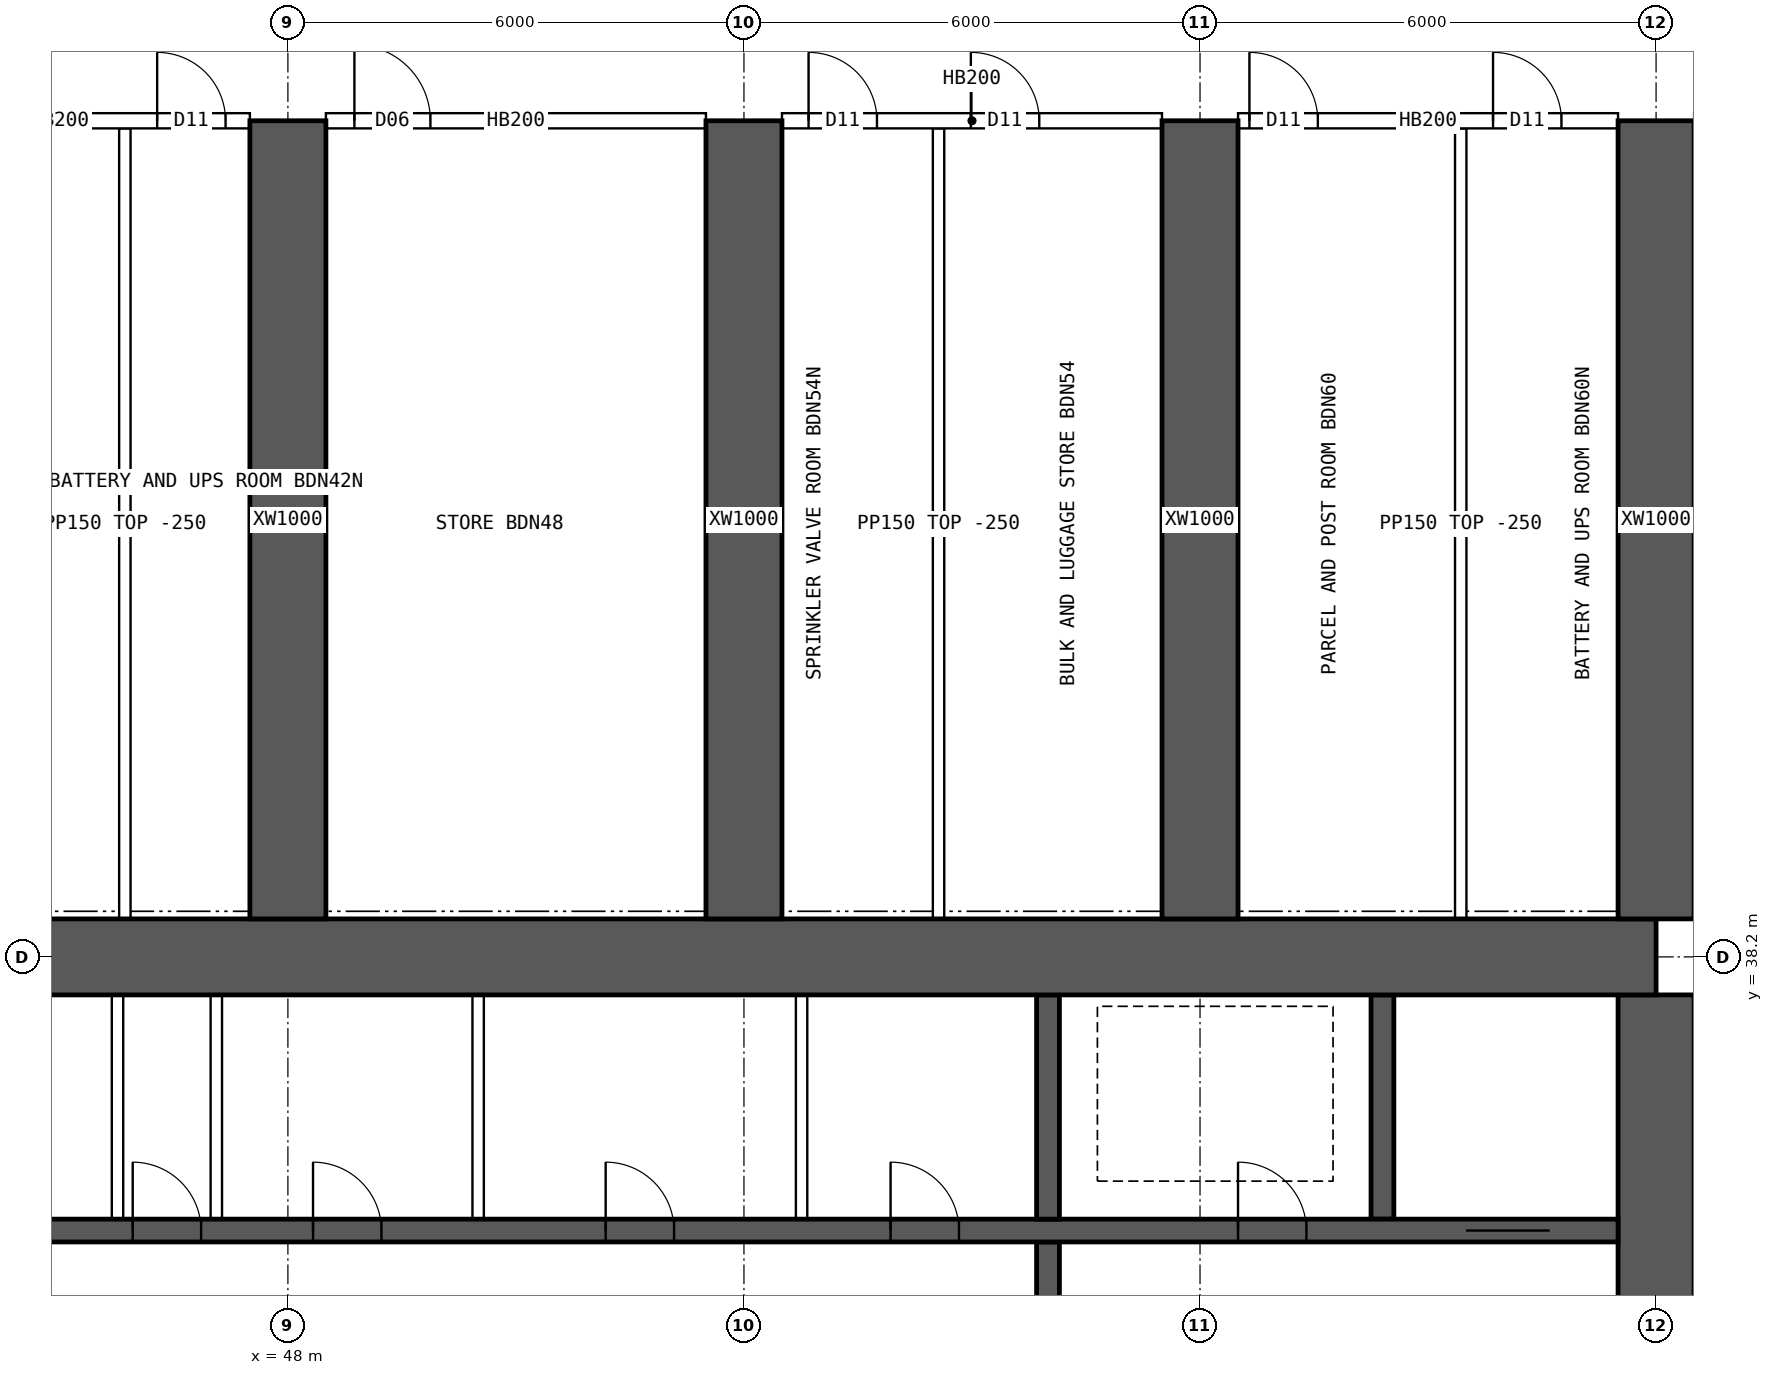
"""IFC4 building model, lengths in metres.
Left out: names, types, materials, properties, quantities, classifications, styles, units other than length and angle.
Written with IfcOpenShell. Run it as: python <this file> out.ifc"""

import sys

from ifc_helpers import new_model, si_unit, direction, frame, frame_2d, origin, place, context, subcontext, project, spatial, rectangle, extrude, element, fill, save


model = new_model("IFC4")
c1 = context("Model", 3, precision=1e-05, world=origin(), true_north=direction((0.0, 1.0)))
c2 = subcontext(c1, "Body", "Model", "MODEL_VIEW")
j1 = project(units=[si_unit("LENGTHUNIT", "METRE"), si_unit("PLANEANGLEUNIT", "RADIAN")], contexts=[c1])
p1 = place(None, origin())
s1 = spatial("IfcSite", under=j1, at=p1, CompositionType="ELEMENT")
p2 = place(p1, origin())
s2 = spatial("IfcBuilding", under=s1, at=p2, CompositionType="ELEMENT")
p3 = place(p2, frame((0.0, 0.0, 23.95)))
s3 = spatial("IfcBuildingStorey", under=s2, at=p3, CompositionType="ELEMENT", Elevation=23.95)
p4 = place(p3, frame((18.0, 38.2, 0.0), z_axis=(0.0, 0.0, 1.0), x_axis=(1.0, 0.0, 0.0)))
e1 = element("IfcWall", 1, at=p4, inside=s3, PredefinedType="SHEAR", context=c2, shape_type="SweptSolid", body=[
    extrude(rectangle(XDim=48.0, YDim=1.0, at=frame_2d((24.0, 0.0))), origin(), (0.0, 0.0, 1.0), 3.75),
])
p5 = place(p3, frame((66.0, 26.3, 0.0), z_axis=(0.0, 0.0, 1.0), x_axis=(0.0, 1.0, 0.0)))
e2 = element("IfcWall", 2, at=p5, inside=s3, PredefinedType="SHEAR", context=c2, shape_type="SweptSolid", body=[
    extrude(rectangle(XDim=11.4, YDim=1.0, at=frame_2d((5.7, 0.0))), origin(), (0.0, 0.0, 1.0), 3.75),
])
p6 = place(p5, frame((5.0, 0.0, 0.0)))
e3 = element("IfcOpeningElement", 3, at=p6, cuts=e2, PredefinedType="OPENING", context=c2, shape_type="SweptSolid", body=[
    extrude(rectangle(XDim=1.2, YDim=2.1, at=frame_2d((0.6, 1.05))), frame((0.0, 0.51, 0.0), z_axis=(0.0, -1.0, 0.0), x_axis=(1.0, 0.0, 0.0)), (0.0, 0.0, 1.0), 1.02),
])
p7 = place(p3, frame((18.5, 34.6, 0.0), z_axis=(0.0, 0.0, 1.0), x_axis=(1.0, 0.0, 0.0)))
e4 = element("IfcWall", 4, at=p7, inside=s3, PredefinedType="SHEAR", context=c2, shape_type="SweptSolid", body=[
    extrude(rectangle(XDim=47.0, YDim=0.3, at=frame_2d((23.5, 0.0))), origin(), (0.0, 0.0, 1.0), 3.75),
])
p8 = place(p7, frame((0.9, 0.0, 0.0)))
e5 = element("IfcOpeningElement", 5, at=p8, cuts=e4, PredefinedType="OPENING", context=c2, shape_type="SweptSolid", body=[
    extrude(rectangle(XDim=1.1, YDim=2.1, at=frame_2d((0.55, 1.05))), frame((0.0, 0.16, 0.0), z_axis=(0.0, -1.0, 0.0), x_axis=(1.0, 0.0, 0.0)), (0.0, 0.0, 1.0), 0.32),
])
p9 = place(p7, frame((45.0, 0.0, 0.0)))
e6 = element("IfcOpeningElement", 6, at=p9, cuts=e4, PredefinedType="OPENING", context=c2, shape_type="SweptSolid", body=[
    extrude(rectangle(XDim=1.1, YDim=2.1, at=frame_2d((0.55, 1.05))), frame((0.0, 0.16, 0.0), z_axis=(0.0, -1.0, 0.0), x_axis=(1.0, 0.0, 0.0)), (0.0, 0.0, 1.0), 0.32),
])
p10 = place(p7, frame((4.1, 0.0, 0.0)))
e7 = element("IfcOpeningElement", 7, at=p10, cuts=e4, PredefinedType="OPENING", context=c2, shape_type="SweptSolid", body=[
    extrude(rectangle(XDim=0.9, YDim=2.1, at=frame_2d((0.45, 1.05))), frame((0.0, 0.16, 0.0), z_axis=(0.0, -1.0, 0.0), x_axis=(1.0, 0.0, 0.0)), (0.0, 0.0, 1.0), 0.32),
])
p11 = place(p7, frame((42.0, 0.0, 0.0)))
e8 = element("IfcOpeningElement", 8, at=p11, cuts=e4, PredefinedType="OPENING", context=c2, shape_type="SweptSolid", body=[
    extrude(rectangle(XDim=0.9, YDim=2.1, at=frame_2d((0.45, 1.05))), frame((0.0, 0.16, 0.0), z_axis=(0.0, -1.0, 0.0), x_axis=(1.0, 0.0, 0.0)), (0.0, 0.0, 1.0), 0.32),
])
p12 = place(p7, frame((8.875, 0.0, 0.0)))
e9 = element("IfcOpeningElement", 9, at=p12, cuts=e4, PredefinedType="OPENING", context=c2, shape_type="SweptSolid", body=[
    extrude(rectangle(XDim=0.9, YDim=2.1, at=frame_2d((0.45, 1.05))), frame((0.0, 0.16, 0.0), z_axis=(0.0, -1.0, 0.0), x_axis=(1.0, 0.0, 0.0)), (0.0, 0.0, 1.0), 0.32),
])
p13 = place(p7, frame((12.849, 0.0, 0.0)))
e10 = element("IfcOpeningElement", 10, at=p13, cuts=e4, PredefinedType="OPENING", context=c2, shape_type="SweptSolid", body=[
    extrude(rectangle(XDim=0.9, YDim=2.1, at=frame_2d((0.45, 1.05))), frame((0.0, 0.16, 0.0), z_axis=(0.0, -1.0, 0.0), x_axis=(1.0, 0.0, 0.0)), (0.0, 0.0, 1.0), 0.32),
])
p14 = place(p7, frame((16.496, 0.0, 0.0)))
e11 = element("IfcOpeningElement", 11, at=p14, cuts=e4, PredefinedType="OPENING", context=c2, shape_type="SweptSolid", body=[
    extrude(rectangle(XDim=0.9, YDim=2.1, at=frame_2d((0.45, 1.05))), frame((0.0, 0.16, 0.0), z_axis=(0.0, -1.0, 0.0), x_axis=(1.0, 0.0, 0.0)), (0.0, 0.0, 1.0), 0.32),
])
p15 = place(p7, frame((20.255, 0.0, 0.0)))
e12 = element("IfcOpeningElement", 12, at=p15, cuts=e4, PredefinedType="OPENING", context=c2, shape_type="SweptSolid", body=[
    extrude(rectangle(XDim=0.9, YDim=2.1, at=frame_2d((0.45, 1.05))), frame((0.0, 0.16, 0.0), z_axis=(0.0, -1.0, 0.0), x_axis=(1.0, 0.0, 0.0)), (0.0, 0.0, 1.0), 0.32),
])
p16 = place(p7, frame((24.661, 0.0, 0.0)))
e13 = element("IfcOpeningElement", 13, at=p16, cuts=e4, PredefinedType="OPENING", context=c2, shape_type="SweptSolid", body=[
    extrude(rectangle(XDim=0.9, YDim=2.1, at=frame_2d((0.45, 1.05))), frame((0.0, 0.16, 0.0), z_axis=(0.0, -1.0, 0.0), x_axis=(1.0, 0.0, 0.0)), (0.0, 0.0, 1.0), 0.32),
])
p17 = place(p7, frame((27.458, 0.0, 0.0)))
e14 = element("IfcOpeningElement", 14, at=p17, cuts=e4, PredefinedType="OPENING", context=c2, shape_type="SweptSolid", body=[
    extrude(rectangle(XDim=0.9, YDim=2.1, at=frame_2d((0.45, 1.05))), frame((0.0, 0.16, 0.0), z_axis=(0.0, -1.0, 0.0), x_axis=(1.0, 0.0, 0.0)), (0.0, 0.0, 1.0), 0.32),
])
p18 = place(p7, frame((29.831, 0.0, 0.0)))
e15 = element("IfcOpeningElement", 15, at=p18, cuts=e4, PredefinedType="OPENING", context=c2, shape_type="SweptSolid", body=[
    extrude(rectangle(XDim=0.9, YDim=2.1, at=frame_2d((0.45, 1.05))), frame((0.0, 0.16, 0.0), z_axis=(0.0, -1.0, 0.0), x_axis=(1.0, 0.0, 0.0)), (0.0, 0.0, 1.0), 0.32),
])
p19 = place(p7, frame((33.68, 0.0, 0.0)))
e16 = element("IfcOpeningElement", 16, at=p19, cuts=e4, PredefinedType="OPENING", context=c2, shape_type="SweptSolid", body=[
    extrude(rectangle(XDim=0.9, YDim=2.1, at=frame_2d((0.45, 1.05))), frame((0.0, 0.16, 0.0), z_axis=(0.0, -1.0, 0.0), x_axis=(1.0, 0.0, 0.0)), (0.0, 0.0, 1.0), 0.32),
])
p20 = place(p7, frame((37.429, 0.0, 0.0)))
e17 = element("IfcOpeningElement", 17, at=p20, cuts=e4, PredefinedType="OPENING", context=c2, shape_type="SweptSolid", body=[
    extrude(rectangle(XDim=0.9, YDim=2.1, at=frame_2d((0.45, 1.05))), frame((0.0, 0.16, 0.0), z_axis=(0.0, -1.0, 0.0), x_axis=(1.0, 0.0, 0.0)), (0.0, 0.0, 1.0), 0.32),
])
p21 = place(p3, frame((58.0, 30.55, 0.0), z_axis=(0.0, 0.0, 1.0), x_axis=(0.0, 1.0, 0.0)))
e18 = element("IfcWall", 18, at=p21, inside=s3, PredefinedType="SHEAR", context=c2, shape_type="SweptSolid", body=[
    extrude(rectangle(XDim=3.9, YDim=0.3, at=frame_2d((1.95, 0.0))), origin(), (0.0, 0.0, 1.0), 3.75),
])
p22 = place(p21, frame((1.4, 0.0, 0.0)))
e19 = element("IfcOpeningElement", 19, at=p22, cuts=e18, PredefinedType="OPENING", context=c2, shape_type="SweptSolid", body=[
    extrude(rectangle(XDim=1.2, YDim=2.1, at=frame_2d((0.6, 1.05))), frame((0.0, 0.16, 0.0), z_axis=(0.0, -1.0, 0.0), x_axis=(1.0, 0.0, 0.0)), (0.0, 0.0, 1.0), 0.32),
])
for number, where, z_axis, x_axis in (
    (20, (62.4, 34.75, 0.0), (0.0, 0.0, 1.0), (0.0, 1.0, 0.0)),
    (21, (58.0, 34.75, 0.0), (0.0, 0.0, 1.0), (0.0, 1.0, 0.0)),
):
    element("IfcWall", number, at=place(p3, frame(where, z_axis=z_axis, x_axis=x_axis)), inside=s3, PredefinedType="SHEAR", context=c2, shape_type="SweptSolid", body=[
        extrude(rectangle(XDim=2.95, YDim=0.3, at=frame_2d((1.475, 0.0))), origin(), (0.0, 0.0, 1.0), 3.75),
    ])
for number, where, z_axis, x_axis in (
    (22, (48.0, 38.7, 0.0), (0.0, 0.0, 1.0), (0.0, 1.0, 0.0)),
    (23, (54.0, 38.7, 0.0), (0.0, 0.0, 1.0), (0.0, 1.0, 0.0)),
    (24, (60.0, 38.7, 0.0), (0.0, 0.0, 1.0), (0.0, 1.0, 0.0)),
    (25, (66.0, 38.7, 0.0), (0.0, 0.0, 1.0), (0.0, 1.0, 0.0)),
):
    element("IfcWall", number, at=place(p3, frame(where, z_axis=z_axis, x_axis=x_axis)), inside=s3, PredefinedType="SHEAR", context=c2, shape_type="SweptSolid", body=[
        extrude(rectangle(XDim=10.5, YDim=1.0, at=frame_2d((5.25, 0.0))), origin(), (0.0, 0.0, 1.0), 3.75),
    ])
for number, where, z_axis, x_axis in (
    (26, (45.758, 34.75, 0.0), (0.0, 0.0, 1.0), (0.0, 1.0, 0.0)),
    (27, (47.058, 34.75, 0.0), (0.0, 0.0, 1.0), (0.0, 1.0, 0.0)),
    (28, (50.503, 34.75, 0.0), (0.0, 0.0, 1.0), (0.0, 1.0, 0.0)),
    (29, (54.758, 34.75, 0.0), (0.0, 0.0, 1.0), (0.0, 1.0, 0.0)),
):
    element("IfcWall", number, at=place(p3, frame(where, z_axis=z_axis, x_axis=x_axis)), inside=s3, PredefinedType="SOLIDWALL", context=c2, shape_type="SweptSolid", body=[
        extrude(rectangle(XDim=2.95, YDim=0.15, at=frame_2d((1.475, 0.0))), origin(), (0.0, 0.0, 1.0), 3.5),
    ])
p23 = place(p3, frame((42.5, 49.2, 0.0), z_axis=(0.0, 0.0, 1.0), x_axis=(1.0, 0.0, 0.0)))
e30 = element("IfcWall", 30, at=p23, inside=s3, PredefinedType="SOLIDWALL", context=c2, shape_type="SweptSolid", body=[
    extrude(rectangle(XDim=5.0, YDim=0.2, at=frame_2d((2.5, 0.0))), origin(), (0.0, 0.0, 1.0), 3.5),
])
p24 = place(p23, frame((0.35, 0.0, 0.0)))
e31 = element("IfcOpeningElement", 31, at=p24, cuts=e30, PredefinedType="OPENING", context=c2, shape_type="SweptSolid", body=[
    extrude(rectangle(XDim=0.9, YDim=2.1, at=frame_2d((0.45, 1.05))), frame((0.0, 0.11, 0.0), z_axis=(0.0, -1.0, 0.0), x_axis=(1.0, 0.0, 0.0)), (0.0, 0.0, 1.0), 0.22),
])
p25 = place(p23, frame((3.78, 0.0, 0.0)))
e32 = element("IfcOpeningElement", 32, at=p25, cuts=e30, PredefinedType="OPENING", context=c2, shape_type="SweptSolid", body=[
    extrude(rectangle(XDim=0.9, YDim=2.1, at=frame_2d((0.45, 1.05))), frame((0.0, 0.11, 0.0), z_axis=(0.0, -1.0, 0.0), x_axis=(1.0, 0.0, 0.0)), (0.0, 0.0, 1.0), 0.22),
])
p26 = place(p3, frame((48.5, 49.2, 0.0), z_axis=(0.0, 0.0, 1.0), x_axis=(1.0, 0.0, 0.0)))
e33 = element("IfcWall", 33, at=p26, inside=s3, PredefinedType="SOLIDWALL", context=c2, shape_type="SweptSolid", body=[
    extrude(rectangle(XDim=5.0, YDim=0.2, at=frame_2d((2.5, 0.0))), origin(), (0.0, 0.0, 1.0), 3.5),
])
p27 = place(p26, frame((0.375, 0.0, 0.0)))
e34 = element("IfcOpeningElement", 34, at=p27, cuts=e33, PredefinedType="OPENING", context=c2, shape_type="SweptSolid", body=[
    extrude(rectangle(XDim=1.0, YDim=2.1, at=frame_2d((0.5, 1.05))), frame((0.0, 0.11, 0.0), z_axis=(0.0, -1.0, 0.0), x_axis=(1.0, 0.0, 0.0)), (0.0, 0.0, 1.0), 0.22),
])
p28 = place(p3, frame((54.5, 49.2, 0.0), z_axis=(0.0, 0.0, 1.0), x_axis=(1.0, 0.0, 0.0)))
e35 = element("IfcWall", 35, at=p28, inside=s3, PredefinedType="SOLIDWALL", context=c2, shape_type="SweptSolid", body=[
    extrude(rectangle(XDim=5.0, YDim=0.2, at=frame_2d((2.5, 0.0))), origin(), (0.0, 0.0, 1.0), 3.5),
])
p29 = place(p28, frame((0.35, 0.0, 0.0)))
e36 = element("IfcOpeningElement", 36, at=p29, cuts=e35, PredefinedType="OPENING", context=c2, shape_type="SweptSolid", body=[
    extrude(rectangle(XDim=0.9, YDim=2.1, at=frame_2d((0.45, 1.05))), frame((0.0, 0.11, 0.0), z_axis=(0.0, -1.0, 0.0), x_axis=(1.0, 0.0, 0.0)), (0.0, 0.0, 1.0), 0.22),
])
p30 = place(p28, frame((2.485, 0.0, 0.0)))
e37 = element("IfcOpeningElement", 37, at=p30, cuts=e35, PredefinedType="OPENING", context=c2, shape_type="SweptSolid", body=[
    extrude(rectangle(XDim=0.9, YDim=2.1, at=frame_2d((0.45, 1.05))), frame((0.0, 0.11, 0.0), z_axis=(0.0, -1.0, 0.0), x_axis=(1.0, 0.0, 0.0)), (0.0, 0.0, 1.0), 0.22),
])
p31 = place(p3, frame((60.5, 49.2, 0.0), z_axis=(0.0, 0.0, 1.0), x_axis=(1.0, 0.0, 0.0)))
e38 = element("IfcWall", 38, at=p31, inside=s3, PredefinedType="SOLIDWALL", context=c2, shape_type="SweptSolid", body=[
    extrude(rectangle(XDim=5.0, YDim=0.2, at=frame_2d((2.5, 0.0))), origin(), (0.0, 0.0, 1.0), 3.5),
])
p32 = place(p31, frame((0.15, 0.0, 0.0)))
e39 = element("IfcOpeningElement", 39, at=p32, cuts=e38, PredefinedType="OPENING", context=c2, shape_type="SweptSolid", body=[
    extrude(rectangle(XDim=0.9, YDim=2.1, at=frame_2d((0.45, 1.05))), frame((0.0, 0.11, 0.0), z_axis=(0.0, -1.0, 0.0), x_axis=(1.0, 0.0, 0.0)), (0.0, 0.0, 1.0), 0.22),
])
p33 = place(p31, frame((3.355, 0.0, 0.0)))
e40 = element("IfcOpeningElement", 40, at=p33, cuts=e38, PredefinedType="OPENING", context=c2, shape_type="SweptSolid", body=[
    extrude(rectangle(XDim=0.9, YDim=2.1, at=frame_2d((0.45, 1.05))), frame((0.0, 0.11, 0.0), z_axis=(0.0, -1.0, 0.0), x_axis=(1.0, 0.0, 0.0)), (0.0, 0.0, 1.0), 0.22),
])
for number, where, z_axis, x_axis in (
    (41, (45.855, 38.7, 0.0), (0.0, 0.0, 1.0), (0.0, 1.0, 0.0)),
    (42, (56.56, 38.7, 0.0), (0.0, 0.0, 1.0), (0.0, 1.0, 0.0)),
    (43, (63.43, 38.7, 0.0), (0.0, 0.0, 1.0), (0.0, 1.0, 0.0)),
):
    element("IfcWall", number, at=place(p3, frame(where, z_axis=z_axis, x_axis=x_axis)), inside=s3, PredefinedType="PARTITIONING", context=c2, shape_type="SweptSolid", body=[
        extrude(rectangle(XDim=10.4, YDim=0.15, at=frame_2d((5.2, 0.0))), origin(), (0.0, 0.0, 1.0), 3.5),
    ])
p34 = place(p9, origin())
e44 = element("IfcDoor", 44, at=p34, inside=s3, OperationType="DOUBLE_DOOR_SLIDING", PredefinedType="DOOR", context=c2, shape_type="SweptSolid", body=[
    extrude(rectangle(XDim=1.1, YDim=2.1, at=frame_2d((0.55, 1.05))), frame((0.0, 0.025, 0.0), z_axis=(0.0, -1.0, 0.0), x_axis=(1.0, 0.0, 0.0)), (0.0, 0.0, 1.0), 0.05),
])
fill(e6, e44)
p35 = place(p11, origin())
e45 = element("IfcDoor", 45, at=p35, inside=s3, OperationType="SINGLE_SWING_LEFT", PredefinedType="DOOR", context=c2, shape_type="SweptSolid", body=[
    extrude(rectangle(XDim=0.9, YDim=2.1, at=frame_2d((0.45, 1.05))), frame((0.0, 0.025, 0.0), z_axis=(0.0, -1.0, 0.0), x_axis=(1.0, 0.0, 0.0)), (0.0, 0.0, 1.0), 0.05),
])
fill(e8, e45)
p36 = place(p17, origin())
e46 = element("IfcDoor", 46, at=p36, inside=s3, OperationType="SINGLE_SWING_LEFT", PredefinedType="DOOR", context=c2, shape_type="SweptSolid", body=[
    extrude(rectangle(XDim=0.9, YDim=2.1, at=frame_2d((0.45, 1.05))), frame((0.0, 0.025, 0.0), z_axis=(0.0, -1.0, 0.0), x_axis=(1.0, 0.0, 0.0)), (0.0, 0.0, 1.0), 0.05),
])
fill(e14, e46)
p37 = place(p18, origin())
e47 = element("IfcDoor", 47, at=p37, inside=s3, OperationType="SINGLE_SWING_LEFT", PredefinedType="DOOR", context=c2, shape_type="SweptSolid", body=[
    extrude(rectangle(XDim=0.9, YDim=2.1, at=frame_2d((0.45, 1.05))), frame((0.0, 0.025, 0.0), z_axis=(0.0, -1.0, 0.0), x_axis=(1.0, 0.0, 0.0)), (0.0, 0.0, 1.0), 0.05),
])
fill(e15, e47)
p38 = place(p19, origin())
e48 = element("IfcDoor", 48, at=p38, inside=s3, OperationType="SINGLE_SWING_LEFT", PredefinedType="DOOR", context=c2, shape_type="SweptSolid", body=[
    extrude(rectangle(XDim=0.9, YDim=2.1, at=frame_2d((0.45, 1.05))), frame((0.0, 0.025, 0.0), z_axis=(0.0, -1.0, 0.0), x_axis=(1.0, 0.0, 0.0)), (0.0, 0.0, 1.0), 0.05),
])
fill(e16, e48)
p39 = place(p20, origin())
e49 = element("IfcDoor", 49, at=p39, inside=s3, OperationType="SINGLE_SWING_LEFT", PredefinedType="DOOR", context=c2, shape_type="SweptSolid", body=[
    extrude(rectangle(XDim=0.9, YDim=2.1, at=frame_2d((0.45, 1.05))), frame((0.0, 0.025, 0.0), z_axis=(0.0, -1.0, 0.0), x_axis=(1.0, 0.0, 0.0)), (0.0, 0.0, 1.0), 0.05),
])
fill(e17, e49)
p40 = place(p25, origin())
e50 = element("IfcDoor", 50, at=p40, inside=s3, OperationType="SINGLE_SWING_LEFT", PredefinedType="DOOR", context=c2, shape_type="SweptSolid", body=[
    extrude(rectangle(XDim=0.9, YDim=2.1, at=frame_2d((0.45, 1.05))), frame((0.0, 0.025, 0.0), z_axis=(0.0, -1.0, 0.0), x_axis=(1.0, 0.0, 0.0)), (0.0, 0.0, 1.0), 0.05),
])
fill(e32, e50)
p41 = place(p27, origin())
e51 = element("IfcDoor", 51, at=p41, inside=s3, OperationType="SINGLE_SWING_LEFT", PredefinedType="DOOR", context=c2, shape_type="SweptSolid", body=[
    extrude(rectangle(XDim=1.0, YDim=2.1, at=frame_2d((0.5, 1.05))), frame((0.0, 0.025, 0.0), z_axis=(0.0, -1.0, 0.0), x_axis=(1.0, 0.0, 0.0)), (0.0, 0.0, 1.0), 0.05),
])
fill(e34, e51)
p42 = place(p29, origin())
e52 = element("IfcDoor", 52, at=p42, inside=s3, OperationType="SINGLE_SWING_LEFT", PredefinedType="DOOR", context=c2, shape_type="SweptSolid", body=[
    extrude(rectangle(XDim=0.9, YDim=2.1, at=frame_2d((0.45, 1.05))), frame((0.0, 0.025, 0.0), z_axis=(0.0, -1.0, 0.0), x_axis=(1.0, 0.0, 0.0)), (0.0, 0.0, 1.0), 0.05),
])
fill(e36, e52)
p43 = place(p30, origin())
e53 = element("IfcDoor", 53, at=p43, inside=s3, OperationType="SINGLE_SWING_LEFT", PredefinedType="DOOR", context=c2, shape_type="SweptSolid", body=[
    extrude(rectangle(XDim=0.9, YDim=2.1, at=frame_2d((0.45, 1.05))), frame((0.0, 0.025, 0.0), z_axis=(0.0, -1.0, 0.0), x_axis=(1.0, 0.0, 0.0)), (0.0, 0.0, 1.0), 0.05),
])
fill(e37, e53)
p44 = place(p32, origin())
e54 = element("IfcDoor", 54, at=p44, inside=s3, OperationType="SINGLE_SWING_LEFT", PredefinedType="DOOR", context=c2, shape_type="SweptSolid", body=[
    extrude(rectangle(XDim=0.9, YDim=2.1, at=frame_2d((0.45, 1.05))), frame((0.0, 0.025, 0.0), z_axis=(0.0, -1.0, 0.0), x_axis=(1.0, 0.0, 0.0)), (0.0, 0.0, 1.0), 0.05),
])
fill(e39, e54)
p45 = place(p33, origin())
e55 = element("IfcDoor", 55, at=p45, inside=s3, OperationType="SINGLE_SWING_LEFT", PredefinedType="DOOR", context=c2, shape_type="SweptSolid", body=[
    extrude(rectangle(XDim=0.9, YDim=2.1, at=frame_2d((0.45, 1.05))), frame((0.0, 0.025, 0.0), z_axis=(0.0, -1.0, 0.0), x_axis=(1.0, 0.0, 0.0)), (0.0, 0.0, 1.0), 0.05),
])
fill(e40, e55)
save(model, sys.argv[1])
